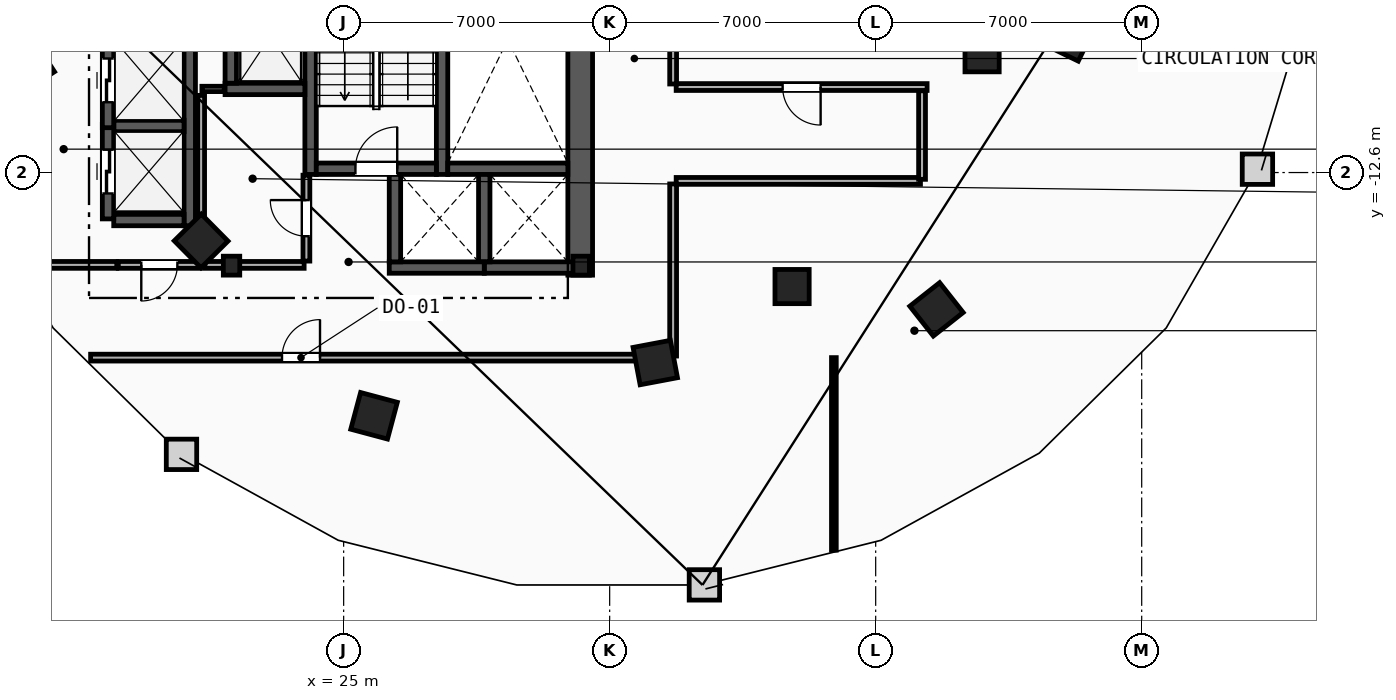
"""IFC4 building model, lengths in metres.
Left out: names, types, materials, properties, quantities, classifications, styles, units other than length and angle.
Written with IfcOpenShell. Run it as: python <this file> out.ifc"""

import sys

from ifc_helpers import new_model, si_unit, direction, frame, frame_2d, origin, origin_2d, place, context, subcontext, project, spatial, rectangle, i_section, extrude, element, fill, save


model = new_model("IFC4")
c1 = context("Model", 3, precision=1e-05, world=origin(), true_north=direction((0.0, 1.0)))
c2 = subcontext(c1, "Body", "Model", "MODEL_VIEW")
j1 = project(units=[si_unit("LENGTHUNIT", "METRE"), si_unit("PLANEANGLEUNIT", "RADIAN")], contexts=[c1])
p1 = place(None, origin())
s1 = spatial("IfcSite", under=j1, at=p1, CompositionType="ELEMENT")
p2 = place(p1, origin())
s2 = spatial("IfcBuilding", under=s1, at=p2, CompositionType="ELEMENT")
p3 = place(p2, frame((0.0, 0.0, 140.4)))
s3 = spatial("IfcBuildingStorey", under=s2, at=p3, CompositionType="ELEMENT", Elevation=140.4)
for number, where, z_axis, x_axis in (
    (1, (22.05, -15.05, 0.0), (0.0, 0.0, 1.0), (1.0, 0.0, 0.0)),
    (2, (31.25, -15.05, 0.0), (0.0, 0.0, 1.0), (1.0, 0.0, 0.0)),
):
    element("IfcColumn", number, at=place(p3, frame(where, z_axis=z_axis, x_axis=x_axis)), inside=s3, PredefinedType="COLUMN", context=c2, shape_type="SweptSolid", body=[
        extrude(i_section(OverallWidth=0.432, OverallDepth=0.498, WebThickness=0.056, FlangeThickness=0.089, FilletRadius=0.018, at=origin_2d()), origin(), (0.0, 0.0, 1.0), 3.6),
    ])
for number, where, z_axis, x_axis in (
    (3, (41.8, -9.5, 0.0), (0.0, 0.0, 1.0), (1.0, 0.0, 0.0)),
    (4, (36.8, -15.6, 0.0), (0.0, 0.0, 1.0), (1.0, 0.0, 0.0)),
):
    element("IfcColumn", number, at=place(p3, frame(where, z_axis=z_axis, x_axis=x_axis)), inside=s3, PredefinedType="COLUMN", context=c2, shape_type="SweptSolid", body=[
        extrude(rectangle(XDim=0.9, YDim=0.9, at=origin_2d()), origin(), (0.0, 0.0, 1.0), 3.6),
    ])
for number, where, z_axis, x_axis in (
    (5, (16.7, -9.8, 0.0), (0.0, 0.0, 1.0), (0.544, -0.839, 0.0)),
    (6, (21.25, -14.4, 0.0), (0.0, 0.0, 1.0), (0.703, -0.711, 0.0)),
    (7, (25.8, -19.0, 0.0), (0.0, 0.0, 1.0), (0.966, -0.259, 0.0)),
    (8, (33.2, -17.6, 0.0), (0.0, 0.0, 1.0), (0.983, 0.186, 0.0)),
    (9, (40.6, -16.2, 0.0), (0.0, 0.0, 1.0), (0.785, 0.619, 0.0)),
    (10, (44.1, -9.0, 0.0), (0.0, 0.0, 1.0), (0.437, 0.899, 0.0)),
):
    element("IfcColumn", number, at=place(p3, frame(where, z_axis=z_axis, x_axis=x_axis)), inside=s3, PredefinedType="COLUMN", context=c2, shape_type="SweptSolid", body=[
        extrude(rectangle(XDim=1.0, YDim=1.0, at=origin_2d()), origin(), (0.0, 0.0, 1.0), 3.6),
    ])
p4 = place(p3, frame((31.225, -15.3, 0.0), z_axis=(0.0, 0.0, 1.0), x_axis=(0.0, 1.0, 0.0)))
e11 = element("IfcWall", 11, at=p4, inside=s3, PredefinedType="SHEAR", context=c2, shape_type="SweptSolid", body=[
    extrude(rectangle(XDim=13.33, YDim=0.65, at=frame_2d((6.665, 0.0))), origin(), (0.0, 0.0, 1.0), 3.36),
])
for number, where, z_axis, x_axis in (
    (12, (27.59, -12.65, 0.0), (0.0, 0.0, 1.0), (0.0, 1.0, 0.0)),
    (13, (24.13, -12.65, 0.0), (0.0, 0.0, 1.0), (0.0, 1.0, 0.0)),
):
    element("IfcWall", number, at=place(p3, frame(where, z_axis=z_axis, x_axis=x_axis)), inside=s3, PredefinedType="SHEAR", context=c2, shape_type="SweptSolid", body=[
        extrude(rectangle(XDim=10.68, YDim=0.3, at=frame_2d((5.34, 0.0))), origin(), (0.0, 0.0, 1.0), 3.36),
    ])
p5 = place(p3, frame((27.74, -12.5, 0.0), z_axis=(0.0, 0.0, 1.0), x_axis=(1.0, 0.0, 0.0)))
e14 = element("IfcWall", 14, at=p5, inside=s3, PredefinedType="SHEAR", context=c2, shape_type="SweptSolid", body=[
    extrude(rectangle(XDim=3.16, YDim=0.3, at=frame_2d((1.58, 0.0))), origin(), (0.0, 0.0, 1.0), 3.36),
])
p6 = place(p3, frame((24.28, -12.5, 0.0), z_axis=(0.0, 0.0, 1.0), x_axis=(1.0, 0.0, 0.0)))
e15 = element("IfcWall", 15, at=p6, inside=s3, PredefinedType="SHEAR", context=c2, shape_type="SweptSolid", body=[
    extrude(rectangle(XDim=3.16, YDim=0.3, at=frame_2d((1.58, 0.0))), origin(), (0.0, 0.0, 1.0), 3.36),
])
p7 = place(p6, frame((1.03, 0.0, 0.0)))
e16 = element("IfcOpeningElement", 16, at=p7, cuts=e15, PredefinedType="OPENING", context=c2, shape_type="SweptSolid", body=[
    extrude(rectangle(XDim=1.1, YDim=2.15, at=frame_2d((0.55, 1.075))), frame((0.0, 0.16, 0.0), z_axis=(0.0, -1.0, 0.0), x_axis=(1.0, 0.0, 0.0)), (0.0, 0.0, 1.0), 0.32),
])
p8 = place(p3, frame((21.88, -10.4, 0.0), z_axis=(0.0, 0.0, 1.0), x_axis=(1.0, 0.0, 0.0)))
e17 = element("IfcWall", 17, at=p8, inside=s3, PredefinedType="SHEAR", context=c2, shape_type="SweptSolid", body=[
    extrude(rectangle(XDim=2.1, YDim=0.3, at=frame_2d((1.05, 0.0))), origin(), (0.0, 0.0, 1.0), 3.36),
])
for number, where, z_axis, x_axis in (
    (18, (22.03, -10.25, 0.0), (0.0, 0.0, 1.0), (0.0, 1.0, 0.0)),
    (19, (28.7, -15.1, 0.0), (0.0, 0.0, 1.0), (1.0, 0.0, 0.0)),
):
    element("IfcWall", number, at=place(p3, frame(where, z_axis=z_axis, x_axis=x_axis)), inside=s3, PredefinedType="SHEAR", context=c2, shape_type="SweptSolid", body=[
        extrude(rectangle(XDim=2.5, YDim=0.3, at=frame_2d((1.25, 0.0))), origin(), (0.0, 0.0, 1.0), 3.36),
    ])
p9 = place(p3, frame((28.7, -14.95, 0.0), z_axis=(0.0, 0.0, 1.0), x_axis=(0.0, 1.0, 0.0)))
e20 = element("IfcWall", 20, at=p9, inside=s3, PredefinedType="SHEAR", context=c2, shape_type="SweptSolid", body=[
    extrude(rectangle(XDim=2.3, YDim=0.3, at=frame_2d((1.15, 0.0))), origin(), (0.0, 0.0, 1.0), 3.36),
])
p10 = place(p3, frame((26.2, -15.1, 0.0), z_axis=(0.0, 0.0, 1.0), x_axis=(1.0, 0.0, 0.0)))
e21 = element("IfcWall", 21, at=p10, inside=s3, PredefinedType="SHEAR", context=c2, shape_type="SweptSolid", body=[
    extrude(rectangle(XDim=2.5, YDim=0.3, at=frame_2d((1.25, 0.0))), origin(), (0.0, 0.0, 1.0), 3.36),
])
p11 = place(p3, frame((26.35, -14.95, 0.0), z_axis=(0.0, 0.0, 1.0), x_axis=(0.0, 1.0, 0.0)))
e22 = element("IfcWall", 22, at=p11, inside=s3, PredefinedType="SHEAR", context=c2, shape_type="SweptSolid", body=[
    extrude(rectangle(XDim=2.3, YDim=0.3, at=frame_2d((1.15, 0.0))), origin(), (0.0, 0.0, 1.0), 3.36),
])
p12 = place(p3, frame((20.95, -14.0, 0.0), z_axis=(0.0, 0.0, 1.0), x_axis=(0.0, 1.0, 0.0)))
e23 = element("IfcWall", 23, at=p12, inside=s3, PredefinedType="SHEAR", context=c2, shape_type="SweptSolid", body=[
    extrude(rectangle(XDim=5.25, YDim=0.3, at=frame_2d((2.625, 0.0))), origin(), (0.0, 0.0, 1.0), 3.36),
])
for number, where, z_axis, x_axis in (
    (24, (18.95, -13.85, 0.0), (0.0, 0.0, 1.0), (1.0, 0.0, 0.0)),
    (25, (18.95, -11.375, 0.0), (0.0, 0.0, 1.0), (1.0, 0.0, 0.0)),
):
    element("IfcWall", number, at=place(p3, frame(where, z_axis=z_axis, x_axis=x_axis)), inside=s3, PredefinedType="SHEAR", context=c2, shape_type="SweptSolid", body=[
        extrude(rectangle(XDim=1.85, YDim=0.3, at=frame_2d((0.925, 0.0))), origin(), (0.0, 0.0, 1.0), 3.36),
    ])
p13 = place(p3, frame((18.8, -13.82, 0.0), z_axis=(0.0, 0.0, 1.0), x_axis=(0.0, 1.0, 0.0)))
e26 = element("IfcWall", 26, at=p13, inside=s3, PredefinedType="SHEAR", context=c2, shape_type="SweptSolid", body=[
    extrude(rectangle(XDim=2.49, YDim=0.3, at=frame_2d((1.245, 0.0))), origin(), (0.0, 0.0, 1.0), 3.36),
])
p14 = place(p13, frame((0.67, 0.0, 0.0)))
e27 = element("IfcOpeningElement", 27, at=p14, cuts=e26, PredefinedType="OPENING", context=c2, shape_type="SweptSolid", body=[
    extrude(rectangle(XDim=1.15, YDim=2.2, at=frame_2d((0.575, 1.1))), frame((0.0, 0.16, 0.0), z_axis=(0.0, -1.0, 0.0), x_axis=(1.0, 0.0, 0.0)), (0.0, 0.0, 1.0), 0.32),
])
p15 = place(p3, frame((18.8, -11.42, 0.0), z_axis=(0.0, 0.0, 1.0), x_axis=(0.0, 1.0, 0.0)))
e28 = element("IfcWall", 28, at=p15, inside=s3, PredefinedType="SHEAR", context=c2, shape_type="SweptSolid", body=[
    extrude(rectangle(XDim=2.49, YDim=0.3, at=frame_2d((1.245, 0.0))), origin(), (0.0, 0.0, 1.0), 3.36),
])
p16 = place(p15, frame((0.67, 0.0, 0.0)))
e29 = element("IfcOpeningElement", 29, at=p16, cuts=e28, PredefinedType="OPENING", context=c2, shape_type="SweptSolid", body=[
    extrude(rectangle(XDim=1.15, YDim=2.2, at=frame_2d((0.575, 1.1))), frame((0.0, 0.16, 0.0), z_axis=(0.0, -1.0, 0.0), x_axis=(1.0, 0.0, 0.0)), (0.0, 0.0, 1.0), 0.32),
])
p17 = place(p3, frame((17.04, -15.03, 0.0), z_axis=(0.0, 0.0, 1.0), x_axis=(1.0, 0.0, 0.0)))
e30 = element("IfcWall", 30, at=p17, inside=s3, PredefinedType="PARTITIONING", context=c2, shape_type="SweptSolid", body=[
    extrude(rectangle(XDim=1.99, YDim=0.18, at=frame_2d((0.995, 0.0))), origin(), (0.0, 0.0, 1.0), 3.36),
])
p18 = place(p3, frame((21.23, -15.03, 0.0), z_axis=(0.0, 0.0, 1.0), x_axis=(-1.0, 0.0, 0.0)))
e31 = element("IfcWall", 31, at=p18, inside=s3, PredefinedType="PARTITIONING", context=c2, shape_type="SweptSolid", body=[
    extrude(rectangle(XDim=2.16, YDim=0.18, at=frame_2d((1.08, 0.0))), origin(), (0.0, 0.0, 1.0), 3.36),
])
p19 = place(p18, frame((0.605, 0.0, 0.0)))
e32 = element("IfcOpeningElement", 32, at=p19, cuts=e31, PredefinedType="OPENING", context=c2, shape_type="SweptSolid", body=[
    extrude(rectangle(XDim=0.95, YDim=2.1, at=frame_2d((0.475, 1.05))), frame((0.0, 0.1, 0.0), z_axis=(0.0, -1.0, 0.0), x_axis=(1.0, 0.0, 0.0)), (0.0, 0.0, 1.0), 0.2),
])
p20 = place(p3, frame((21.27, -10.4, 0.0), z_axis=(0.0, 0.0, 1.0), x_axis=(1.0, 0.0, 0.0)))
e33 = element("IfcWall", 33, at=p20, inside=s3, PredefinedType="PARTITIONING", context=c2, shape_type="SweptSolid", body=[
    extrude(rectangle(XDim=0.59, YDim=0.14, at=frame_2d((0.295, 0.0))), origin(), (0.0, 0.0, 1.0), 3.36),
])
p21 = place(p3, frame((21.25, -14.93, 0.0), z_axis=(0.0, 0.0, 1.0), x_axis=(0.0, 1.0, 0.0)))
e34 = element("IfcWall", 34, at=p21, inside=s3, PredefinedType="PARTITIONING", context=c2, shape_type="SweptSolid", body=[
    extrude(rectangle(XDim=4.36, YDim=0.18, at=frame_2d((2.18, 0.0))), origin(), (0.0, 0.0, 1.0), 3.36),
])
p22 = place(p3, frame((21.35, -15.03, 0.0), z_axis=(0.0, 0.0, 1.0), x_axis=(1.0, 0.0, 0.0)))
e35 = element("IfcWall", 35, at=p22, inside=s3, PredefinedType="PARTITIONING", context=c2, shape_type="SweptSolid", body=[
    extrude(rectangle(XDim=2.61, YDim=0.18, at=frame_2d((1.305, 0.0))), origin(), (0.0, 0.0, 1.0), 2.433),
])
p23 = place(p3, frame((24.02, -14.93, 0.0), z_axis=(0.0, 0.0, 1.0), x_axis=(0.0, 1.0, 0.0)))
e36 = element("IfcWall", 36, at=p23, inside=s3, PredefinedType="PARTITIONING", context=c2, shape_type="SweptSolid", body=[
    extrude(rectangle(XDim=2.26, YDim=0.18, at=frame_2d((1.13, 0.0))), origin(), (0.0, 0.0, 1.0), 3.36),
])
p24 = place(p23, frame((0.655, 0.0, 0.0)))
e37 = element("IfcOpeningElement", 37, at=p24, cuts=e36, PredefinedType="OPENING", context=c2, shape_type="SweptSolid", body=[
    extrude(rectangle(XDim=0.95, YDim=2.1, at=frame_2d((0.475, 1.05))), frame((0.0, 0.1, 0.0), z_axis=(0.0, -1.0, 0.0), x_axis=(1.0, 0.0, 0.0)), (0.0, 0.0, 1.0), 0.2),
])
p25 = place(p3, frame((37.9, -22.536, 0.0), z_axis=(0.0, 0.0, 1.0), x_axis=(0.0, 1.0, 0.0)))
e38 = element("IfcWall", 38, at=p25, inside=s3, PredefinedType="PARTITIONING", context=c2, shape_type="SweptSolid", body=[
    extrude(rectangle(XDim=5.066, YDim=0.125, at=frame_2d((2.533, 0.0))), origin(), (0.0, 0.0, 1.0), 3.36),
])
p26 = place(p3, frame((18.342, -17.47, 0.0), z_axis=(0.0, 0.0, 1.0), x_axis=(1.0, 0.0, 0.0)))
e39 = element("IfcWall", 39, at=p26, inside=s3, PredefinedType="PARTITIONING", context=c2, shape_type="SweptSolid", body=[
    extrude(rectangle(XDim=15.287, YDim=0.18, at=frame_2d((7.643, 0.0))), origin(), (0.0, 0.0, 1.0), 3.36),
])
p27 = place(p26, frame((5.036, 0.0, 0.0)))
e40 = element("IfcOpeningElement", 40, at=p27, cuts=e39, PredefinedType="OPENING", context=c2, shape_type="SweptSolid", body=[
    extrude(rectangle(XDim=1.0, YDim=2.15, at=frame_2d((0.5, 1.075))), frame((0.0, 0.1, 0.0), z_axis=(0.0, -1.0, 0.0), x_axis=(1.0, 0.0, 0.0)), (0.0, 0.0, 1.0), 0.2),
])
p28 = place(p3, frame((33.75, -12.82, 0.0), z_axis=(0.0, 0.0, 1.0), x_axis=(1.0, 0.0, 0.0)))
e41 = element("IfcWall", 41, at=p28, inside=s3, PredefinedType="PARTITIONING", context=c2, shape_type="SweptSolid", body=[
    extrude(rectangle(XDim=6.428, YDim=0.18, at=frame_2d((3.214, 0.0))), origin(), (0.0, 0.0, 1.0), 3.36),
])
p29 = place(p3, frame((33.67, -17.428, 0.0), z_axis=(0.0, 0.0, 1.0), x_axis=(0.0, 1.0, 0.0)))
e42 = element("IfcWall", 42, at=p29, inside=s3, PredefinedType="PARTITIONING", context=c2, shape_type="SweptSolid", body=[
    extrude(rectangle(XDim=4.529, YDim=0.18, at=frame_2d((2.264, 0.0))), origin(), (0.0, 0.0, 1.0), 3.36),
])
p30 = place(p3, frame((40.22, -12.779, 0.0), z_axis=(0.0, 0.0, 1.0), x_axis=(0.0, 1.0, 0.0)))
e43 = element("IfcWall", 43, at=p30, inside=s3, PredefinedType="PARTITIONING", context=c2, shape_type="SweptSolid", body=[
    extrude(rectangle(XDim=2.329, YDim=0.18, at=frame_2d((1.164, 0.0))), origin(), (0.0, 0.0, 1.0), 3.36),
])
p31 = place(p3, frame((40.353, -10.35, 0.0), z_axis=(0.0, 0.0, 1.0), x_axis=(-1.0, 0.0, 0.0)))
e44 = element("IfcWall", 44, at=p31, inside=s3, PredefinedType="PARTITIONING", context=c2, shape_type="SweptSolid", body=[
    extrude(rectangle(XDim=6.603, YDim=0.18, at=frame_2d((3.301, 0.0))), origin(), (0.0, 0.0, 1.0), 3.36),
])
p32 = place(p31, frame((2.802, 0.0, 0.0)))
e45 = element("IfcOpeningElement", 45, at=p32, cuts=e44, PredefinedType="OPENING", context=c2, shape_type="SweptSolid", body=[
    extrude(rectangle(XDim=1.0, YDim=2.15, at=frame_2d((0.5, 1.075))), frame((0.0, 0.1, 0.0), z_axis=(0.0, -1.0, 0.0), x_axis=(1.0, 0.0, 0.0)), (0.0, 0.0, 1.0), 0.2),
])
p33 = place(p3, frame((33.67, -10.27, 0.0), z_axis=(0.0, 0.0, 1.0), x_axis=(0.0, 1.0, 0.0)))
e46 = element("IfcWall", 46, at=p33, inside=s3, PredefinedType="PARTITIONING", context=c2, shape_type="SweptSolid", body=[
    extrude(rectangle(XDim=1.269, YDim=0.18, at=frame_2d((0.634, 0.0))), origin(), (0.0, 0.0, 1.0), 3.36),
])
p34 = place(p7, origin())
e47 = element("IfcDoor", 47, at=p34, inside=s3, OperationType="SINGLE_SWING_RIGHT", PredefinedType="DOOR", context=c2, shape_type="SweptSolid", body=[
    extrude(rectangle(XDim=1.1, YDim=2.15, at=frame_2d((0.55, 1.075))), frame((0.0, 0.025, 0.0), z_axis=(0.0, -1.0, 0.0), x_axis=(1.0, 0.0, 0.0)), (0.0, 0.0, 1.0), 0.05),
])
fill(e16, e47)
p35 = place(p14, origin())
e48 = element("IfcDoor", 48, at=p35, inside=s3, OperationType="SLIDING_TO_LEFT", PredefinedType="TRAPDOOR", context=c2, shape_type="SweptSolid", body=[
    extrude(rectangle(XDim=1.15, YDim=2.2, at=frame_2d((0.575, 1.1))), frame((0.0, 0.025, 0.0), z_axis=(0.0, -1.0, 0.0), x_axis=(1.0, 0.0, 0.0)), (0.0, 0.0, 1.0), 0.05),
])
fill(e27, e48)
p36 = place(p16, origin())
e49 = element("IfcDoor", 49, at=p36, inside=s3, OperationType="SLIDING_TO_LEFT", PredefinedType="TRAPDOOR", context=c2, shape_type="SweptSolid", body=[
    extrude(rectangle(XDim=1.15, YDim=2.2, at=frame_2d((0.575, 1.1))), frame((0.0, 0.025, 0.0), z_axis=(0.0, -1.0, 0.0), x_axis=(1.0, 0.0, 0.0)), (0.0, 0.0, 1.0), 0.05),
])
fill(e29, e49)
p37 = place(p27, origin())
e50 = element("IfcDoor", 50, at=p37, inside=s3, OperationType="SINGLE_SWING_RIGHT", PredefinedType="DOOR", context=c2, shape_type="SweptSolid", body=[
    extrude(rectangle(XDim=1.0, YDim=2.15, at=frame_2d((0.5, 1.075))), frame((0.0, 0.025, 0.0), z_axis=(0.0, -1.0, 0.0), x_axis=(1.0, 0.0, 0.0)), (0.0, 0.0, 1.0), 0.05),
])
fill(e40, e50)
p38 = place(p32, origin())
e51 = element("IfcDoor", 51, at=p38, inside=s3, OperationType="SINGLE_SWING_LEFT", PredefinedType="DOOR", context=c2, shape_type="SweptSolid", body=[
    extrude(rectangle(XDim=1.0, YDim=2.15, at=frame_2d((0.5, 1.075))), frame((0.0, 0.025, 0.0), z_axis=(0.0, -1.0, 0.0), x_axis=(1.0, 0.0, 0.0)), (0.0, 0.0, 1.0), 0.05),
])
fill(e45, e51)
p39 = place(p24, origin())
e52 = element("IfcDoor", 52, at=p39, inside=s3, OperationType="SINGLE_SWING_RIGHT", PredefinedType="DOOR", context=c2, shape_type="SweptSolid", body=[
    extrude(rectangle(XDim=0.95, YDim=2.1, at=frame_2d((0.475, 1.05))), frame((0.0, 0.025, 0.0), z_axis=(0.0, -1.0, 0.0), x_axis=(1.0, 0.0, 0.0)), (0.0, 0.0, 1.0), 0.05),
])
fill(e37, e52)
p40 = place(p19, origin())
e53 = element("IfcDoor", 53, at=p40, inside=s3, OperationType="SINGLE_SWING_RIGHT", PredefinedType="DOOR", context=c2, shape_type="SweptSolid", body=[
    extrude(rectangle(XDim=0.95, YDim=2.1, at=frame_2d((0.475, 1.05))), frame((0.0, 0.025, 0.0), z_axis=(0.0, -1.0, 0.0), x_axis=(1.0, 0.0, 0.0)), (0.0, 0.0, 1.0), 0.05),
])
fill(e32, e53)
save(model, sys.argv[1])
